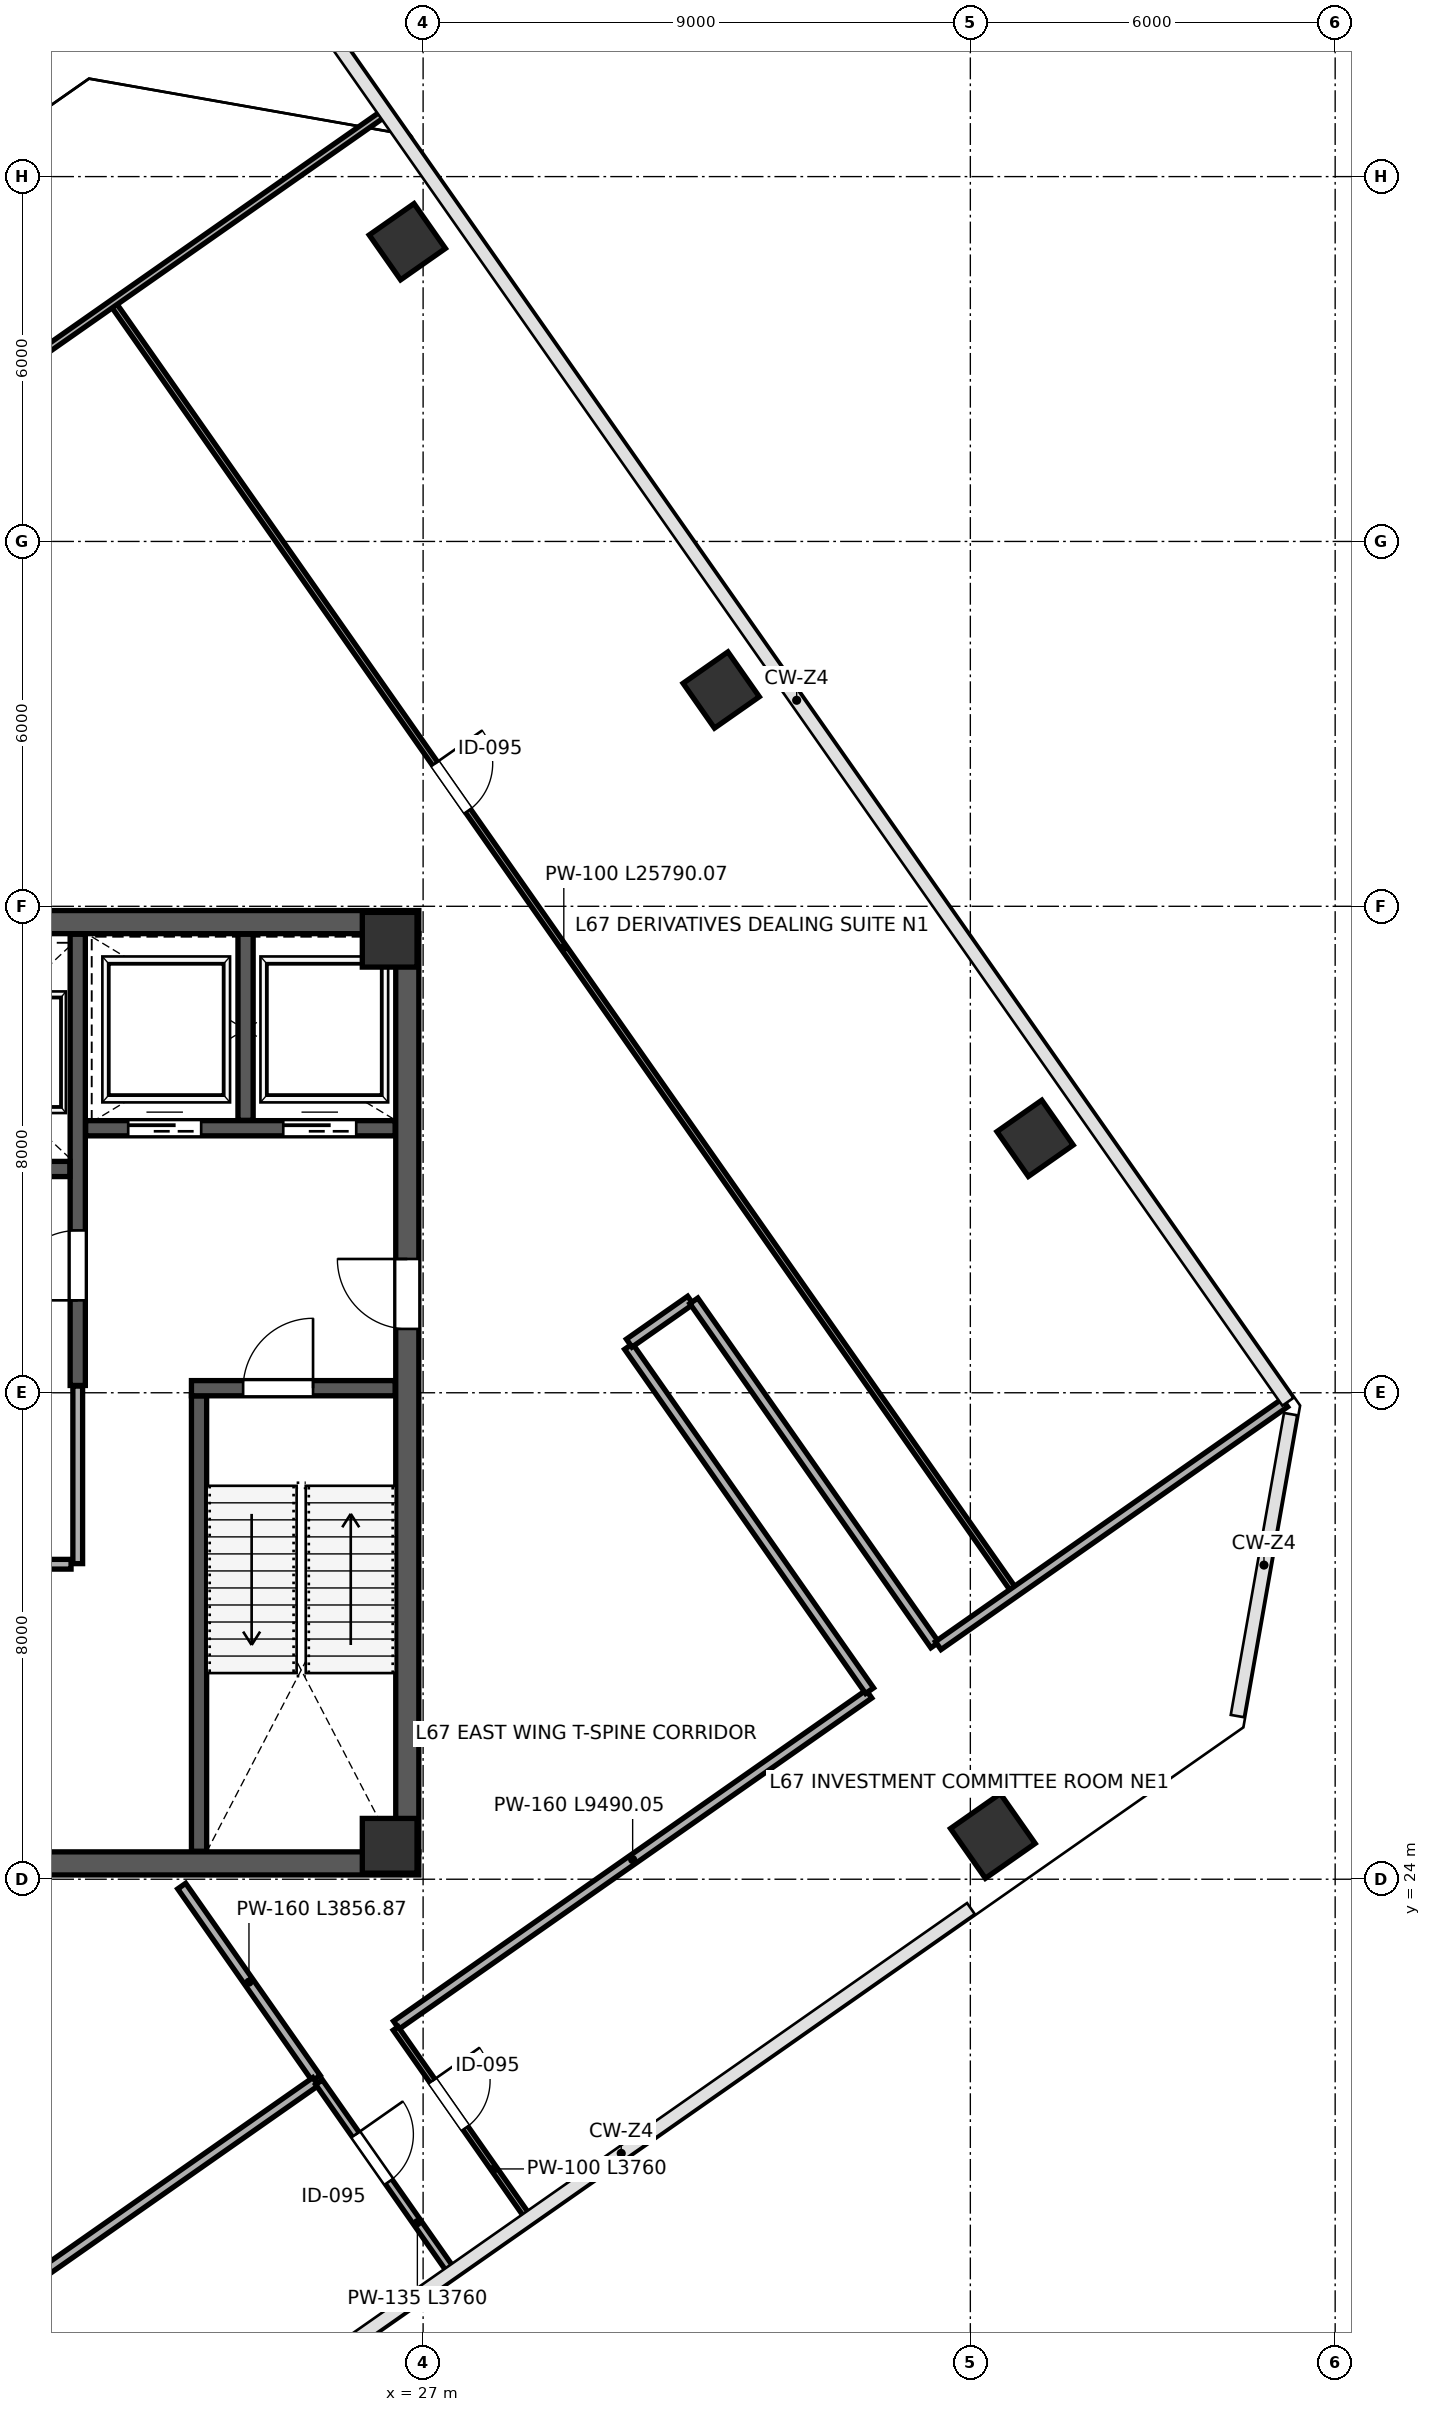
"""IFC4 building model, lengths in metres.
Left out: names, types, materials, properties, quantities, classifications, styles, units other than length and angle.
Written with IfcOpenShell. Run it as: python <this file> out.ifc"""

import sys

from ifc_helpers import new_model, si_unit, direction, frame, frame_2d, origin, origin_2d, place, context, subcontext, project, spatial, rectangle, extrude, source, transform, mapped, element, fill, save


model = new_model("IFC4")
c1 = context("Model", 3, precision=1e-05, world=origin(), true_north=direction((0.0, 1.0)))
c2 = subcontext(c1, "Body", "Model", "MODEL_VIEW")
j1 = project(units=[si_unit("LENGTHUNIT", "METRE"), si_unit("PLANEANGLEUNIT", "RADIAN")], contexts=[c1])
p1 = place(None, origin())
s1 = spatial("IfcSite", under=j1, at=p1, CompositionType="ELEMENT")
p2 = place(p1, origin())
s2 = spatial("IfcBuilding", under=s1, at=p2, CompositionType="ELEMENT")
p3 = place(p2, frame((0.0, 0.0, 298.8)))
s3 = spatial("IfcBuildingStorey", under=s2, at=p3, CompositionType="ELEMENT", Elevation=298.8)
m1 = source(origin(), c2, "Body", "SweptSolid", [
    extrude(rectangle(XDim=0.9, YDim=0.9, at=origin_2d()), origin(), (0.0, 0.0, 1.0), 4.198),
])
for number, where, z_axis, x_axis in (
    (1, (26.45, 24.55, 0.001), (0.0, 0.0, 1.0), (1.0, 0.0, 0.0)),
    (2, (26.45, 39.45, 0.001), (0.0, 0.0, 1.0), (1.0, 0.0, 0.0)),
):
    element("IfcColumn", number, at=place(p3, frame(where, z_axis=z_axis, x_axis=x_axis)), inside=s3, PredefinedType="COLUMN", context=c2, shape_type="MappedRepresentation", body=[
        mapped(m1, transform((0.0, 0.0, 0.0), scale=1.0)),
    ])
m2 = source(origin(), c2, "Body", "SweptSolid", [
    extrude(rectangle(XDim=0.9, YDim=0.9, at=origin_2d()), origin(), (0.0, 0.0, 1.0), 4.198),
])
for number, where, z_axis, x_axis in (
    (3, (26.74, 50.929, 0.001), (0.0, 0.0, 1.0), (-0.574, 0.819, 0.0)),
    (4, (31.903, 43.557, 0.001), (0.0, 0.0, 1.0), (-0.574, 0.819, 0.0)),
    (5, (37.065, 36.184, 0.001), (0.0, 0.0, 1.0), (-0.574, 0.819, 0.0)),
):
    element("IfcColumn", number, at=place(p3, frame(where, z_axis=z_axis, x_axis=x_axis)), inside=s3, PredefinedType="COLUMN", context=c2, shape_type="MappedRepresentation", body=[
        mapped(m2, transform((0.0, 0.0, 0.0), scale=1.0)),
    ])
m3 = source(origin(), c2, "Body", "SweptSolid", [
    extrude(rectangle(XDim=1.0, YDim=1.0, at=origin_2d()), origin(), (0.0, 0.0, 1.0), 4.198),
])
p4 = place(p3, frame((36.37, 24.711, 0.001), z_axis=(0.0, 0.0, 1.0), x_axis=(-0.573576436351, 0.819152044289, 0.0)))
e6 = element("IfcColumn", 6, at=p4, inside=s3, PredefinedType="COLUMN", context=c2, shape_type="MappedRepresentation", body=[
    mapped(m3, transform((0.0, 0.0, 0.0), scale=1.0)),
])
p5 = place(p3, frame((26.74, 24.45, 0.0), z_axis=(0.0, 0.0, 1.0), x_axis=(0.0, 1.0, 0.0)))
e7 = element("IfcWall", 7, at=p5, inside=s3, PredefinedType="SHEAR", context=c2, shape_type="SweptSolid", body=[
    extrude(rectangle(XDim=15.1, YDim=0.38, at=frame_2d((7.55, 0.0))), origin(), (0.0, 0.0, 1.0), 3.96),
])
p6 = place(p5, frame((8.6, 0.0, 0.0)))
e8 = element("IfcOpeningElement", 8, at=p6, cuts=e7, PredefinedType="OPENING", context=c2, shape_type="SweptSolid", body=[
    extrude(rectangle(XDim=1.15, YDim=2.2, at=frame_2d((0.575, 1.1))), frame((0.0, 0.2, 0.0), z_axis=(0.0, -1.0, 0.0), x_axis=(1.0, 0.0, 0.0)), (0.0, 0.0, 1.0), 0.4),
])
for number, where, z_axis, x_axis in (
    (9, (9.07, 24.26, 0.0), (0.0, 0.0, 1.0), (1.0, 0.0, 0.0)),
    (10, (9.07, 39.74, 0.0), (0.0, 0.0, 1.0), (1.0, 0.0, 0.0)),
):
    element("IfcWall", number, at=place(p3, frame(where, z_axis=z_axis, x_axis=x_axis)), inside=s3, PredefinedType="SHEAR", context=c2, shape_type="SweptSolid", body=[
        extrude(rectangle(XDim=17.86, YDim=0.38, at=frame_2d((8.93, 0.0))), origin(), (0.0, 0.0, 1.0), 3.96),
    ])
p7 = place(p3, frame((23.315, 24.46, 0.0), z_axis=(0.0, 0.0, 1.0), x_axis=(0.0, 1.0, 0.0)))
e11 = element("IfcWall", 11, at=p7, inside=s3, PredefinedType="SHEAR", context=c2, shape_type="SweptSolid", body=[
    extrude(rectangle(XDim=7.49, YDim=0.25, at=frame_2d((3.745, 0.0))), origin(), (0.0, 0.0, 1.0), 3.96),
])
p8 = place(p3, frame((23.19, 32.075, 0.0), z_axis=(0.0, 0.0, 1.0), x_axis=(1.0, 0.0, 0.0)))
e12 = element("IfcWall", 12, at=p8, inside=s3, PredefinedType="SHEAR", context=c2, shape_type="SweptSolid", body=[
    extrude(rectangle(XDim=3.35, YDim=0.25, at=frame_2d((1.675, 0.0))), origin(), (0.0, 0.0, 1.0), 3.96),
])
p9 = place(p8, frame((0.85, 0.0, 0.0)))
e13 = element("IfcOpeningElement", 13, at=p9, cuts=e12, PredefinedType="OPENING", context=c2, shape_type="SweptSolid", body=[
    extrude(rectangle(XDim=1.15, YDim=2.2, at=frame_2d((0.575, 1.1))), frame((0.0, 0.135, 0.0), z_axis=(0.0, -1.0, 0.0), x_axis=(1.0, 0.0, 0.0)), (0.0, 0.0, 1.0), 0.27),
])
p10 = place(p3, frame((21.32, 32.12, 0.0), z_axis=(0.0, 0.0, 1.0), x_axis=(0.0, 1.0, 0.0)))
e14 = element("IfcWall", 14, at=p10, inside=s3, PredefinedType="SHEAR", context=c2, shape_type="SweptSolid", body=[
    extrude(rectangle(XDim=7.42, YDim=0.25, at=frame_2d((3.71, 0.0))), origin(), (0.0, 0.0, 1.0), 3.96),
])
p11 = place(p10, frame((1.4, 0.0, 0.0)))
e15 = element("IfcOpeningElement", 15, at=p11, cuts=e14, PredefinedType="OPENING", context=c2, shape_type="SweptSolid", body=[
    extrude(rectangle(XDim=1.15, YDim=2.2, at=frame_2d((0.575, 1.1))), frame((0.0, 0.135, 0.0), z_axis=(0.0, -1.0, 0.0), x_axis=(1.0, 0.0, 0.0)), (0.0, 0.0, 1.0), 0.27),
])
p12 = place(p3, frame((21.45, 36.35, 0.0), z_axis=(0.0, 0.0, 1.0), x_axis=(1.0, 0.0, 0.0)))
e16 = element("IfcWall", 16, at=p12, inside=s3, PredefinedType="SHEAR", context=c2, shape_type="SweptSolid", body=[
    extrude(rectangle(XDim=5.09, YDim=0.25, at=frame_2d((2.545, 0.0))), origin(), (0.0, 0.0, 1.0), 3.96),
])
p13 = place(p12, frame((0.7, 0.0, 0.0)))
e17 = element("IfcOpeningElement", 17, at=p13, cuts=e16, PredefinedType="OPENING", context=c2, shape_type="SweptSolid", body=[
    extrude(rectangle(XDim=1.2, YDim=2.2, at=frame_2d((0.6, 1.1))), frame((0.0, 0.135, 0.0), z_axis=(0.0, -1.0, 0.0), x_axis=(1.0, 0.0, 0.0)), (0.0, 0.0, 1.0), 0.27),
])
p14 = place(p12, frame((3.25, 0.0, 0.0)))
e18 = element("IfcOpeningElement", 18, at=p14, cuts=e16, PredefinedType="OPENING", context=c2, shape_type="SweptSolid", body=[
    extrude(rectangle(XDim=1.2, YDim=2.2, at=frame_2d((0.6, 1.1))), frame((0.0, 0.135, 0.0), z_axis=(0.0, -1.0, 0.0), x_axis=(1.0, 0.0, 0.0)), (0.0, 0.0, 1.0), 0.27),
])
p15 = place(p3, frame((24.08, 36.48, 0.0), z_axis=(0.0, 0.0, 1.0), x_axis=(0.0, 1.0, 0.0)))
e19 = element("IfcWall", 19, at=p15, inside=s3, PredefinedType="SHEAR", context=c2, shape_type="SweptSolid", body=[
    extrude(rectangle(XDim=3.06, YDim=0.25, at=frame_2d((1.53, 0.0))), origin(), (0.0, 0.0, 1.0), 3.96),
])
p16 = place(p3, frame((17.32, 35.68, 0.0), z_axis=(0.0, 0.0, 1.0), x_axis=(1.0, 0.0, 0.0)))
e20 = element("IfcWall", 20, at=p16, inside=s3, PredefinedType="SHEAR", context=c2, shape_type="SweptSolid", body=[
    extrude(rectangle(XDim=3.87, YDim=0.25, at=frame_2d((1.935, 0.0))), origin(), (0.0, 0.0, 1.0), 3.96),
])
p17 = place(p16, frame((0.45, 0.0, 0.0)))
e21 = element("IfcOpeningElement", 21, at=p17, cuts=e20, PredefinedType="OPENING", context=c2, shape_type="SweptSolid", body=[
    extrude(rectangle(XDim=1.1, YDim=2.2, at=frame_2d((0.55, 1.1))), frame((0.0, 0.135, 0.0), z_axis=(0.0, -1.0, 0.0), x_axis=(1.0, 0.0, 0.0)), (0.0, 0.0, 1.0), 0.27),
])
p18 = place(p16, frame((2.35, 0.0, 0.0)))
e22 = element("IfcOpeningElement", 22, at=p18, cuts=e20, PredefinedType="OPENING", context=c2, shape_type="SweptSolid", body=[
    extrude(rectangle(XDim=1.1, YDim=2.2, at=frame_2d((0.55, 1.1))), frame((0.0, 0.135, 0.0), z_axis=(0.0, -1.0, 0.0), x_axis=(1.0, 0.0, 0.0)), (0.0, 0.0, 1.0), 0.27),
])
p19 = place(p3, frame((12.84, 29.18, 0.0), z_axis=(0.0, 0.0, 1.0), x_axis=(1.0, 0.0, 0.0)))
e23 = element("IfcWall", 23, at=p19, inside=s3, PredefinedType="PARTITIONING", context=c2, shape_type="SweptSolid", body=[
    extrude(rectangle(XDim=8.37, YDim=0.16, at=frame_2d((4.185, 0.0))), origin(), (0.0, 0.0, 1.0), 3.96),
])
p20 = place(p19, frame((0.95, 0.0, 0.0)))
e24 = element("IfcOpeningElement", 24, at=p20, cuts=e23, PredefinedType="OPENING", context=c2, shape_type="SweptSolid", body=[
    extrude(rectangle(XDim=0.85, YDim=2.1, at=frame_2d((0.425, 1.05))), frame((0.0, 0.09, 0.0), z_axis=(0.0, -1.0, 0.0), x_axis=(1.0, 0.0, 0.0)), (0.0, 0.0, 1.0), 0.18),
])
p21 = place(p19, frame((4.2, 0.0, 0.0)))
e25 = element("IfcOpeningElement", 25, at=p21, cuts=e23, PredefinedType="OPENING", context=c2, shape_type="SweptSolid", body=[
    extrude(rectangle(XDim=0.85, YDim=2.1, at=frame_2d((0.425, 1.05))), frame((0.0, 0.09, 0.0), z_axis=(0.0, -1.0, 0.0), x_axis=(1.0, 0.0, 0.0)), (0.0, 0.0, 1.0), 0.18),
])
p22 = place(p3, frame((21.32, 29.19, 0.0), z_axis=(0.0, 0.0, 1.0), x_axis=(0.0, 1.0, 0.0)))
e26 = element("IfcWall", 26, at=p22, inside=s3, PredefinedType="PARTITIONING", context=c2, shape_type="SweptSolid", body=[
    extrude(rectangle(XDim=2.92, YDim=0.16, at=frame_2d((1.46, 0.0))), origin(), (0.0, 0.0, 1.0), 3.96),
])
p23 = place(p3, frame((23.03, 23.887, 0.0), z_axis=(0.0, 0.0, 1.0), x_axis=(0.573602525203, -0.819133776059, 0.0)))
e27 = element("IfcWall", 27, at=p23, inside=s3, PredefinedType="PARTITIONING", context=c2, shape_type="SweptSolid", body=[
    extrude(rectangle(XDim=3.857, YDim=0.16, at=frame_2d((1.928, 0.0))), origin(), (0.0, 0.0, 1.0), 3.96),
])
p24 = place(p3, frame((21.918, 49.884, 0.0), z_axis=(0.0, 0.0, 1.0), x_axis=(0.57358495776, -0.819146077468, 0.0)))
e28 = element("IfcWall", 28, at=p24, inside=s3, PredefinedType="PARTITIONING", context=c2, shape_type="SweptSolid", body=[
    extrude(rectangle(XDim=25.79, YDim=0.1, at=frame_2d((12.895, 0.0))), origin(), (0.0, 0.0, 1.0), 3.96),
])
p25 = place(p24, frame((9.2, 0.0, 0.0)))
e29 = element("IfcOpeningElement", 29, at=p25, cuts=e28, PredefinedType="OPENING", context=c2, shape_type="SweptSolid", body=[
    extrude(rectangle(XDim=0.95, YDim=2.15, at=frame_2d((0.475, 1.075))), frame((0.0, 0.06, 0.0), z_axis=(0.0, -1.0, 0.0), x_axis=(1.0, 0.0, 0.0)), (0.0, 0.0, 1.0), 0.12),
])
p26 = place(p3, frame((2.071, 36.036, 0.0), z_axis=(0.0, 0.0, 1.0), x_axis=(0.819154854942, 0.573572422302, 0.0)))
e30 = element("IfcWall", 30, at=p26, inside=s3, PredefinedType="PARTITIONING", context=c2, shape_type="SweptSolid", body=[
    extrude(rectangle(XDim=29.62, YDim=0.115, at=frame_2d((14.81, 0.0))), origin(), (0.0, 0.0, 1.0), 3.96),
])
p27 = place(p26, frame((4.2, 0.0, 0.0)))
e31 = element("IfcOpeningElement", 31, at=p27, cuts=e30, PredefinedType="OPENING", context=c2, shape_type="SweptSolid", body=[
    extrude(rectangle(XDim=0.95, YDim=2.15, at=frame_2d((0.475, 1.075))), frame((0.0, 0.067, 0.0), z_axis=(0.0, -1.0, 0.0), x_axis=(1.0, 0.0, 0.0)), (0.0, 0.0, 1.0), 0.135),
])
p28 = place(p3, frame((26.559, 21.601, 0.0), z_axis=(0.0, 0.0, 1.0), x_axis=(0.819143682501, 0.573588378036, 0.0)))
e32 = element("IfcWall", 32, at=p28, inside=s3, PredefinedType="PARTITIONING", context=c2, shape_type="SweptSolid", body=[
    extrude(rectangle(XDim=9.49, YDim=0.16, at=frame_2d((4.745, 0.0))), origin(), (0.0, 0.0, 1.0), 3.96),
])
p29 = place(p3, frame((30.379, 32.76, 0.0), z_axis=(0.0, 0.0, 1.0), x_axis=(0.573609352737, -0.819128995002, 0.0)))
e33 = element("IfcWall", 33, at=p29, inside=s3, PredefinedType="PARTITIONING", context=c2, shape_type="SweptSolid", body=[
    extrude(rectangle(XDim=6.91, YDim=0.16, at=frame_2d((3.455, 0.0))), origin(), (0.0, 0.0, 1.0), 3.96),
])
p30 = place(p3, frame((30.389, 32.816, 0.0), z_axis=(0.0, 0.0, 1.0), x_axis=(0.819129336916, 0.573608864475, 0.0)))
e34 = element("IfcWall", 34, at=p30, inside=s3, PredefinedType="PARTITIONING", context=c2, shape_type="SweptSolid", body=[
    extrude(rectangle(XDim=1.23, YDim=0.16, at=frame_2d((0.615, 0.0))), origin(), (0.0, 0.0, 1.0), 3.96),
])
p31 = place(p3, frame((31.453, 33.512, 0.0), z_axis=(0.0, 0.0, 1.0), x_axis=(0.573585645457, -0.819145595927, 0.0)))
e35 = element("IfcWall", 35, at=p31, inside=s3, PredefinedType="PARTITIONING", context=c2, shape_type="SweptSolid", body=[
    extrude(rectangle(XDim=6.91, YDim=0.16, at=frame_2d((3.455, 0.0))), origin(), (0.0, 0.0, 1.0), 3.96),
])
p32 = place(p3, frame((35.472, 27.842, 0.0), z_axis=(0.0, 0.0, 1.0), x_axis=(0.819151164872, 0.573577692287, 0.0)))
e36 = element("IfcWall", 36, at=p32, inside=s3, PredefinedType="PARTITIONING", context=c2, shape_type="SweptSolid", body=[
    extrude(rectangle(XDim=6.96, YDim=0.16, at=frame_2d((3.48, 0.0))), origin(), (0.0, 0.0, 1.0), 3.96),
])
p33 = place(p3, frame((15.747, 14.03, 0.0), z_axis=(0.0, 0.0, 1.0), x_axis=(0.819150694041, 0.573578364701, 0.0)))
e37 = element("IfcWall", 37, at=p33, inside=s3, PredefinedType="PARTITIONING", context=c2, shape_type="SweptSolid", body=[
    extrude(rectangle(XDim=11.58, YDim=0.16, at=frame_2d((5.79, 0.0))), origin(), (0.0, 0.0, 1.0), 3.96),
])
p34 = place(p3, frame((26.55, 21.546, 0.0), z_axis=(0.0, 0.0, 1.0), x_axis=(0.573614860738, -0.8191251379, 0.0)))
e38 = element("IfcWall", 38, at=p34, inside=s3, PredefinedType="PARTITIONING", context=c2, shape_type="SweptSolid", body=[
    extrude(rectangle(XDim=3.76, YDim=0.1, at=frame_2d((1.88, 0.0))), origin(), (0.0, 0.0, 1.0), 3.96),
])
p35 = place(p34, frame((1.05, 0.0, 0.0)))
e39 = element("IfcOpeningElement", 39, at=p35, cuts=e38, PredefinedType="OPENING", context=c2, shape_type="SweptSolid", body=[
    extrude(rectangle(XDim=0.95, YDim=2.15, at=frame_2d((0.475, 1.075))), frame((0.0, 0.06, 0.0), z_axis=(0.0, -1.0, 0.0), x_axis=(1.0, 0.0, 0.0)), (0.0, 0.0, 1.0), 0.12),
])
p36 = place(p3, frame((25.288, 20.662, 0.0), z_axis=(0.0, 0.0, 1.0), x_axis=(0.573614860738, -0.8191251379, 0.0)))
e40 = element("IfcWall", 40, at=p36, inside=s3, PredefinedType="PARTITIONING", context=c2, shape_type="SweptSolid", body=[
    extrude(rectangle(XDim=3.76, YDim=0.135, at=frame_2d((1.88, 0.0))), origin(), (0.0, 0.0, 1.0), 3.96),
])
p37 = place(p36, frame((1.05, 0.0, 0.0)))
e41 = element("IfcOpeningElement", 41, at=p37, cuts=e40, PredefinedType="OPENING", context=c2, shape_type="SweptSolid", body=[
    extrude(rectangle(XDim=0.95, YDim=2.15, at=frame_2d((0.475, 1.075))), frame((0.0, 0.078, 0.0), z_axis=(0.0, -1.0, 0.0), x_axis=(1.0, 0.0, 0.0)), (0.0, 0.0, 1.0), 0.155),
])
m4 = source(origin(), c2, "Body", "SweptSolid", [
    extrude(rectangle(XDim=1.15, YDim=2.2, at=frame_2d((0.575, 1.1))), frame((0.0, 0.025, 0.0), z_axis=(0.0, -1.0, 0.0), x_axis=(1.0, 0.0, 0.0)), (0.0, 0.0, 1.0), 0.05),
])
p38 = place(p11, origin())
e42 = element("IfcDoor", 42, at=p38, inside=s3, OperationType="SINGLE_SWING_LEFT", PredefinedType="DOOR", context=c2, shape_type="MappedRepresentation", body=[
    mapped(m4, transform((0.0, 0.0, 0.0), scale=1.0)),
])
fill(e15, e42)
m5 = source(origin(), c2, "Body", "SweptSolid", [
    extrude(rectangle(XDim=1.15, YDim=2.2, at=frame_2d((0.575, 1.1))), frame((0.0, 0.025, 0.0), z_axis=(0.0, -1.0, 0.0), x_axis=(1.0, 0.0, 0.0)), (0.0, 0.0, 1.0), 0.05),
])
p39 = place(p9, origin())
e43 = element("IfcDoor", 43, at=p39, inside=s3, OperationType="SINGLE_SWING_RIGHT", PredefinedType="DOOR", context=c2, shape_type="MappedRepresentation", body=[
    mapped(m5, transform((0.0, 0.0, 0.0), scale=1.0)),
])
fill(e13, e43)
p40 = place(p6, origin())
e44 = element("IfcDoor", 44, at=p40, inside=s3, OperationType="SINGLE_SWING_RIGHT", PredefinedType="DOOR", context=c2, shape_type="MappedRepresentation", body=[
    mapped(m4, transform((0.0, 0.0, 0.0), scale=1.0)),
])
fill(e8, e44)
m6 = source(origin(), c2, "Body", "SweptSolid", [
    extrude(rectangle(XDim=1.2, YDim=2.2, at=frame_2d((0.6, 1.1))), frame((0.0, 0.025, 0.0), z_axis=(0.0, -1.0, 0.0), x_axis=(1.0, 0.0, 0.0)), (0.0, 0.0, 1.0), 0.05),
])
p41 = place(p13, origin())
e45 = element("IfcDoor", 45, at=p41, inside=s3, OperationType="SLIDING_TO_LEFT", PredefinedType="DOOR", context=c2, shape_type="MappedRepresentation", body=[
    mapped(m6, transform((0.0, 0.0, 0.0), scale=1.0)),
])
fill(e17, e45)
p42 = place(p14, origin())
e46 = element("IfcDoor", 46, at=p42, inside=s3, OperationType="SLIDING_TO_RIGHT", PredefinedType="DOOR", context=c2, shape_type="MappedRepresentation", body=[
    mapped(m6, transform((0.0, 0.0, 0.0), scale=1.0)),
])
fill(e18, e46)
m7 = source(origin(), c2, "Body", "SweptSolid", [
    extrude(rectangle(XDim=0.95, YDim=2.15, at=frame_2d((0.475, 1.075))), frame((0.0, 0.025, 0.0), z_axis=(0.0, -1.0, 0.0), x_axis=(1.0, 0.0, 0.0)), (0.0, 0.0, 1.0), 0.05),
])
p43 = place(p25, origin())
e47 = element("IfcDoor", 47, at=p43, inside=s3, OperationType="SINGLE_SWING_LEFT", PredefinedType="DOOR", context=c2, shape_type="MappedRepresentation", body=[
    mapped(m7, transform((0.0, 0.0, 0.0), scale=1.0)),
])
fill(e29, e47)
p44 = place(p35, origin())
e48 = element("IfcDoor", 48, at=p44, inside=s3, OperationType="SINGLE_SWING_LEFT", PredefinedType="DOOR", context=c2, shape_type="MappedRepresentation", body=[
    mapped(m7, transform((0.0, 0.0, 0.0), scale=1.0)),
])
fill(e39, e48)
p45 = place(p37, origin())
e49 = element("IfcDoor", 49, at=p45, inside=s3, OperationType="SINGLE_SWING_LEFT", PredefinedType="DOOR", context=c2, shape_type="MappedRepresentation", body=[
    mapped(m7, transform((0.0, 0.0, 0.0), scale=1.0)),
])
fill(e41, e49)
save(model, sys.argv[1])
